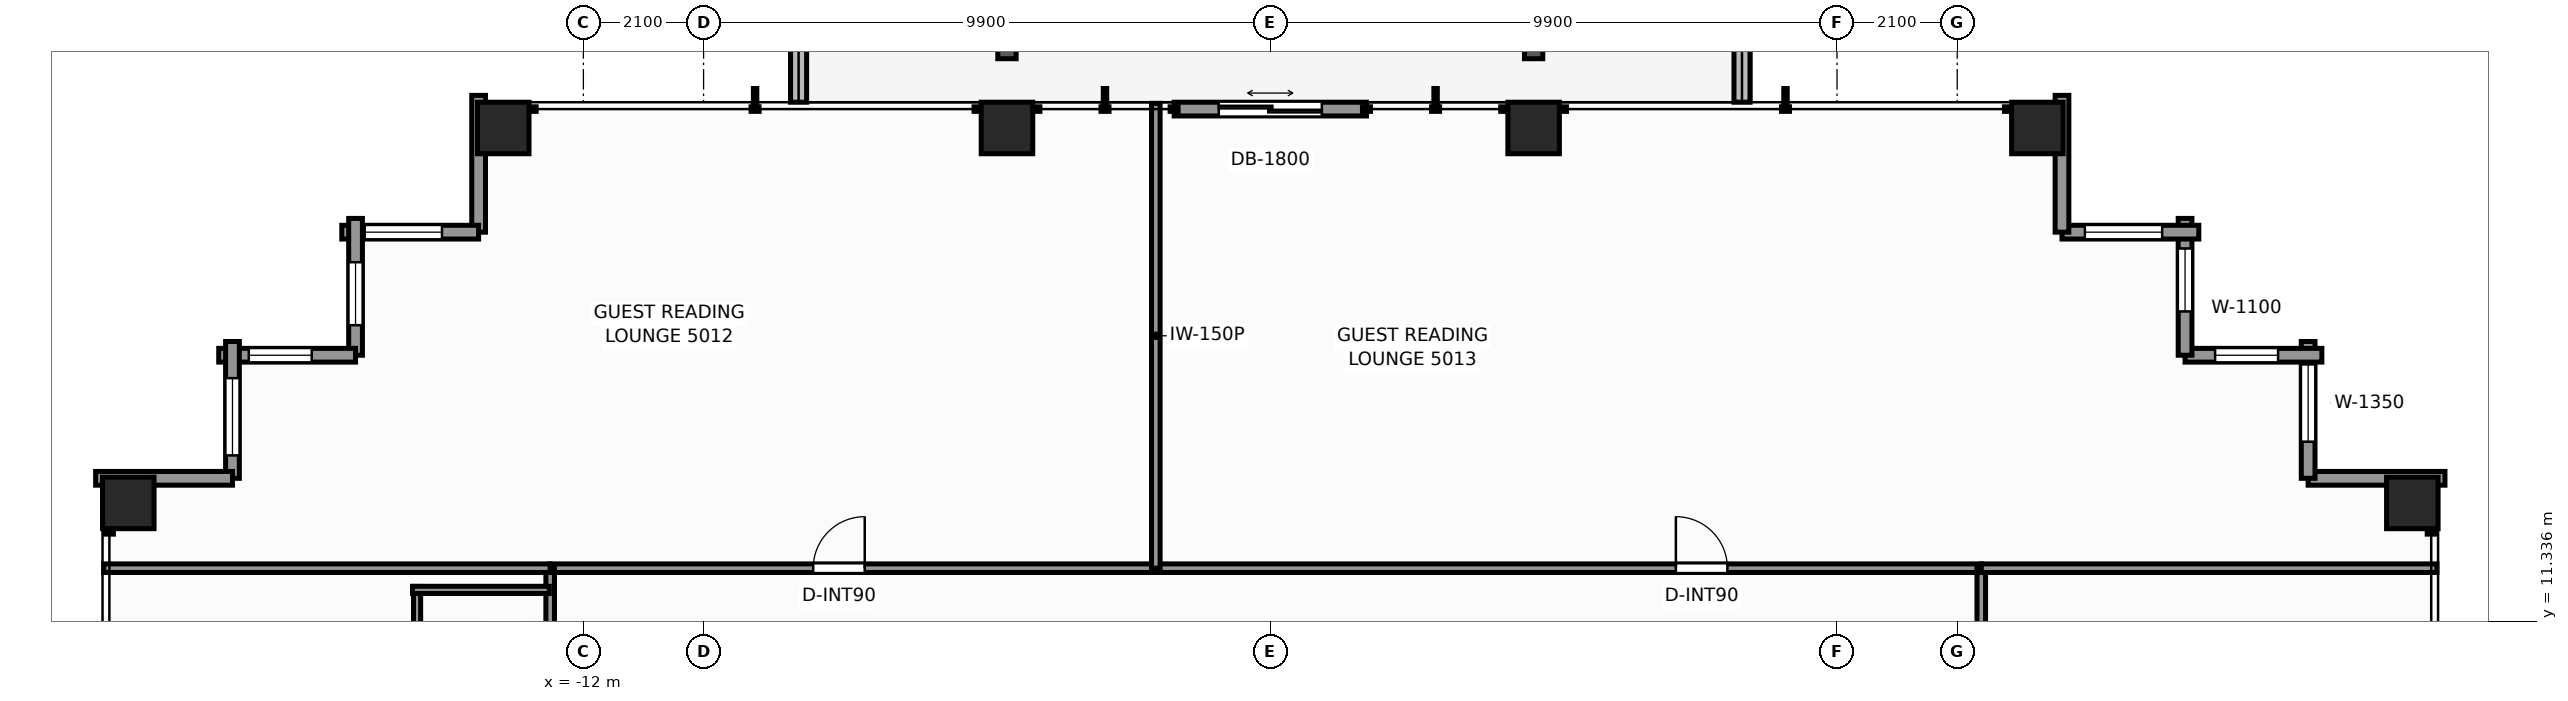
"""IFC4 building model, lengths in metres.
Left out: names, types, materials, properties, quantities, classifications, styles, units other than length and angle.
Written with IfcOpenShell. Run it as: python <this file> out.ifc"""

import sys

from ifc_helpers import new_model, si_unit, direction, frame, frame_2d, origin, origin_2d, place, context, subcontext, project, spatial, rectangle, extrude, element, fill, save


model = new_model("IFC4")
c1 = context("Model", 3, precision=1e-05, world=origin(), true_north=direction((0.0, 1.0)))
c2 = subcontext(c1, "Body", "Model", "MODEL_VIEW")
j1 = project(units=[si_unit("LENGTHUNIT", "METRE"), si_unit("PLANEANGLEUNIT", "RADIAN")], contexts=[c1])
p1 = place(None, origin())
s1 = spatial("IfcSite", under=j1, at=p1, CompositionType="ELEMENT")
p2 = place(p1, origin())
s2 = spatial("IfcBuilding", under=s1, at=p2, CompositionType="ELEMENT")
p3 = place(p2, frame((0.0, 0.0, 173.4)))
s3 = spatial("IfcBuildingStorey", under=s2, at=p3, CompositionType="ELEMENT", Elevation=173.4)
for number, where, z_axis, x_axis in (
    (1, (-13.4, 19.95, 0.0), (0.0, 0.0, 1.0), (1.0, 0.0, 0.0)),
    (2, (-4.6, 19.95, 0.0), (0.0, 0.0, 1.0), (1.0, 0.0, 0.0)),
    (3, (4.6, 19.95, 0.0), (0.0, 0.0, 1.0), (1.0, 0.0, 0.0)),
    (4, (13.4, 19.95, 0.0), (0.0, 0.0, 1.0), (1.0, 0.0, 0.0)),
    (5, (-19.95, 13.4, 0.0), (0.0, 0.0, 1.0), (1.0, 0.0, 0.0)),
    (6, (19.95, 13.4, 0.0), (0.0, 0.0, 1.0), (1.0, 0.0, 0.0)),
):
    element("IfcColumn", number, at=place(p3, frame(where, z_axis=z_axis, x_axis=x_axis)), inside=s3, PredefinedType="COLUMN", context=c2, shape_type="SweptSolid", body=[
        extrude(rectangle(XDim=0.9, YDim=0.9, at=origin_2d()), origin(), (0.0, 0.0, 1.0), 3.3),
    ])
p4 = place(p3, frame((8.24, 20.4, -0.04), z_axis=(0.0, 0.0, 1.0), x_axis=(0.0, 1.0, 0.0)))
e7 = element("IfcWall", 7, at=p4, inside=s3, PredefinedType="PARAPET", context=c2, shape_type="SweptSolid", body=[
    extrude(rectangle(XDim=1.313, YDim=0.28, at=frame_2d((0.656, 0.0))), origin(), (0.0, 0.0, 1.0), 0.42),
])
p5 = place(p3, frame((-8.24, 22.74, -0.04), z_axis=(0.0, 0.0, 1.0), x_axis=(0.0, -1.0, 0.0)))
e8 = element("IfcWall", 8, at=p5, inside=s3, PredefinedType="PARAPET", context=c2, shape_type="SweptSolid", body=[
    extrude(rectangle(XDim=2.34, YDim=0.28, at=frame_2d((1.17, 0.0))), origin(), (0.0, 0.0, 1.0), 0.42),
])
p6 = place(p3, frame((18.13, 13.83, 0.0), z_axis=(0.0, 0.0, 1.0), x_axis=(1.0, 0.0, 0.0)))
e9 = element("IfcWall", 9, at=p6, inside=s3, PredefinedType="STANDARD", context=c2, shape_type="SweptSolid", body=[
    extrude(rectangle(XDim=2.39, YDim=0.24, at=frame_2d((1.195, 0.0))), origin(), (0.0, 0.0, 1.0), 2.463),
])
p7 = place(p3, frame((18.13, 16.22, 0.0), z_axis=(0.0, 0.0, 1.0), x_axis=(0.0, -1.0, 0.0)))
e10 = element("IfcWall", 10, at=p7, inside=s3, PredefinedType="STANDARD", context=c2, shape_type="SweptSolid", body=[
    extrude(rectangle(XDim=2.39, YDim=0.24, at=frame_2d((1.195, 0.0))), origin(), (0.0, 0.0, 1.0), 2.463),
])
p8 = place(p7, frame((0.4, 0.0, 0.65)))
e11 = element("IfcOpeningElement", 11, at=p8, cuts=e10, PredefinedType="OPENING", context=c2, shape_type="SweptSolid", body=[
    extrude(rectangle(XDim=1.35, YDim=1.55, at=frame_2d((0.675, 0.775))), frame((0.0, 0.13, 0.0), z_axis=(0.0, -1.0, 0.0), x_axis=(1.0, 0.0, 0.0)), (0.0, 0.0, 1.0), 0.26),
])
p9 = place(p3, frame((15.98, 15.98, 0.0), z_axis=(0.0, 0.0, 1.0), x_axis=(1.0, 0.0, 0.0)))
e12 = element("IfcWall", 12, at=p9, inside=s3, PredefinedType="STANDARD", context=c2, shape_type="SweptSolid", body=[
    extrude(rectangle(XDim=2.39, YDim=0.24, at=frame_2d((1.195, 0.0))), origin(), (0.0, 0.0, 1.0), 2.463),
])
p10 = place(p9, frame((0.525, 0.0, 0.65)))
e13 = element("IfcOpeningElement", 13, at=p10, cuts=e12, PredefinedType="OPENING", context=c2, shape_type="SweptSolid", body=[
    extrude(rectangle(XDim=1.1, YDim=1.45, at=frame_2d((0.55, 0.725))), frame((0.0, 0.13, 0.0), z_axis=(0.0, -1.0, 0.0), x_axis=(1.0, 0.0, 0.0)), (0.0, 0.0, 1.0), 0.26),
])
p11 = place(p3, frame((15.98, 18.37, 0.0), z_axis=(0.0, 0.0, 1.0), x_axis=(0.0, -1.0, 0.0)))
e14 = element("IfcWall", 14, at=p11, inside=s3, PredefinedType="STANDARD", context=c2, shape_type="SweptSolid", body=[
    extrude(rectangle(XDim=2.39, YDim=0.24, at=frame_2d((1.195, 0.0))), origin(), (0.0, 0.0, 1.0), 2.463),
])
p12 = place(p11, frame((0.525, 0.0, 0.65)))
e15 = element("IfcOpeningElement", 15, at=p12, cuts=e14, PredefinedType="OPENING", context=c2, shape_type="SweptSolid", body=[
    extrude(rectangle(XDim=1.1, YDim=1.45, at=frame_2d((0.55, 0.725))), frame((0.0, 0.13, 0.0), z_axis=(0.0, -1.0, 0.0), x_axis=(1.0, 0.0, 0.0)), (0.0, 0.0, 1.0), 0.26),
])
p13 = place(p3, frame((13.83, 18.13, 0.0), z_axis=(0.0, 0.0, 1.0), x_axis=(1.0, 0.0, 0.0)))
e16 = element("IfcWall", 16, at=p13, inside=s3, PredefinedType="STANDARD", context=c2, shape_type="SweptSolid", body=[
    extrude(rectangle(XDim=2.39, YDim=0.24, at=frame_2d((1.195, 0.0))), origin(), (0.0, 0.0, 1.0), 2.463),
])
p14 = place(p13, frame((0.4, 0.0, 0.65)))
e17 = element("IfcOpeningElement", 17, at=p14, cuts=e16, PredefinedType="OPENING", context=c2, shape_type="SweptSolid", body=[
    extrude(rectangle(XDim=1.35, YDim=1.55, at=frame_2d((0.675, 0.775))), frame((0.0, 0.13, 0.0), z_axis=(0.0, -1.0, 0.0), x_axis=(1.0, 0.0, 0.0)), (0.0, 0.0, 1.0), 0.26),
])
p15 = place(p3, frame((13.83, 20.52, 0.0), z_axis=(0.0, 0.0, 1.0), x_axis=(0.0, -1.0, 0.0)))
e18 = element("IfcWall", 18, at=p15, inside=s3, PredefinedType="STANDARD", context=c2, shape_type="SweptSolid", body=[
    extrude(rectangle(XDim=2.39, YDim=0.24, at=frame_2d((1.195, 0.0))), origin(), (0.0, 0.0, 1.0), 2.463),
])
p16 = place(p3, frame((-1.68, 20.28, 0.0), z_axis=(0.0, 0.0, 1.0), x_axis=(1.0, 0.0, 0.0)))
e19 = element("IfcWall", 19, at=p16, inside=s3, PredefinedType="STANDARD", context=c2, shape_type="SweptSolid", body=[
    extrude(rectangle(XDim=3.36, YDim=0.24, at=frame_2d((1.68, 0.0))), origin(), (0.0, 0.0, 1.0), 3.08),
])
p17 = place(p16, frame((0.78, 0.0, 0.0)))
e20 = element("IfcOpeningElement", 20, at=p17, cuts=e19, PredefinedType="OPENING", context=c2, shape_type="SweptSolid", body=[
    extrude(rectangle(XDim=1.8, YDim=2.2, at=frame_2d((0.9, 1.1))), frame((0.0, 0.13, 0.0), z_axis=(0.0, -1.0, 0.0), x_axis=(1.0, 0.0, 0.0)), (0.0, 0.0, 1.0), 0.26),
])
p18 = place(p3, frame((-13.83, 18.13, 0.0), z_axis=(0.0, 0.0, 1.0), x_axis=(0.0, 1.0, 0.0)))
e21 = element("IfcWall", 21, at=p18, inside=s3, PredefinedType="STANDARD", context=c2, shape_type="SweptSolid", body=[
    extrude(rectangle(XDim=2.39, YDim=0.24, at=frame_2d((1.195, 0.0))), origin(), (0.0, 0.0, 1.0), 2.463),
])
p19 = place(p3, frame((-16.22, 18.13, 0.0), z_axis=(0.0, 0.0, 1.0), x_axis=(1.0, 0.0, 0.0)))
e22 = element("IfcWall", 22, at=p19, inside=s3, PredefinedType="STANDARD", context=c2, shape_type="SweptSolid", body=[
    extrude(rectangle(XDim=2.39, YDim=0.24, at=frame_2d((1.195, 0.0))), origin(), (0.0, 0.0, 1.0), 2.463),
])
p20 = place(p19, frame((0.4, 0.0, 0.65)))
e23 = element("IfcOpeningElement", 23, at=p20, cuts=e22, PredefinedType="OPENING", context=c2, shape_type="SweptSolid", body=[
    extrude(rectangle(XDim=1.35, YDim=1.55, at=frame_2d((0.675, 0.775))), frame((0.0, 0.13, 0.0), z_axis=(0.0, -1.0, 0.0), x_axis=(1.0, 0.0, 0.0)), (0.0, 0.0, 1.0), 0.26),
])
p21 = place(p3, frame((-15.98, 15.98, 0.0), z_axis=(0.0, 0.0, 1.0), x_axis=(0.0, 1.0, 0.0)))
e24 = element("IfcWall", 24, at=p21, inside=s3, PredefinedType="STANDARD", context=c2, shape_type="SweptSolid", body=[
    extrude(rectangle(XDim=2.39, YDim=0.24, at=frame_2d((1.195, 0.0))), origin(), (0.0, 0.0, 1.0), 2.463),
])
p22 = place(p21, frame((0.525, 0.0, 0.65)))
e25 = element("IfcOpeningElement", 25, at=p22, cuts=e24, PredefinedType="OPENING", context=c2, shape_type="SweptSolid", body=[
    extrude(rectangle(XDim=1.1, YDim=1.45, at=frame_2d((0.55, 0.725))), frame((0.0, 0.13, 0.0), z_axis=(0.0, -1.0, 0.0), x_axis=(1.0, 0.0, 0.0)), (0.0, 0.0, 1.0), 0.26),
])
p23 = place(p3, frame((-18.37, 15.98, 0.0), z_axis=(0.0, 0.0, 1.0), x_axis=(1.0, 0.0, 0.0)))
e26 = element("IfcWall", 26, at=p23, inside=s3, PredefinedType="STANDARD", context=c2, shape_type="SweptSolid", body=[
    extrude(rectangle(XDim=2.39, YDim=0.24, at=frame_2d((1.195, 0.0))), origin(), (0.0, 0.0, 1.0), 2.463),
])
p24 = place(p23, frame((0.525, 0.0, 0.65)))
e27 = element("IfcOpeningElement", 27, at=p24, cuts=e26, PredefinedType="OPENING", context=c2, shape_type="SweptSolid", body=[
    extrude(rectangle(XDim=1.1, YDim=1.45, at=frame_2d((0.55, 0.725))), frame((0.0, 0.13, 0.0), z_axis=(0.0, -1.0, 0.0), x_axis=(1.0, 0.0, 0.0)), (0.0, 0.0, 1.0), 0.26),
])
p25 = place(p3, frame((-18.13, 13.83, 0.0), z_axis=(0.0, 0.0, 1.0), x_axis=(0.0, 1.0, 0.0)))
e28 = element("IfcWall", 28, at=p25, inside=s3, PredefinedType="STANDARD", context=c2, shape_type="SweptSolid", body=[
    extrude(rectangle(XDim=2.39, YDim=0.24, at=frame_2d((1.195, 0.0))), origin(), (0.0, 0.0, 1.0), 2.463),
])
p26 = place(p25, frame((0.4, 0.0, 0.65)))
e29 = element("IfcOpeningElement", 29, at=p26, cuts=e28, PredefinedType="OPENING", context=c2, shape_type="SweptSolid", body=[
    extrude(rectangle(XDim=1.35, YDim=1.55, at=frame_2d((0.675, 0.775))), frame((0.0, 0.13, 0.0), z_axis=(0.0, -1.0, 0.0), x_axis=(1.0, 0.0, 0.0)), (0.0, 0.0, 1.0), 0.26),
])
p27 = place(p3, frame((-20.52, 13.83, 0.0), z_axis=(0.0, 0.0, 1.0), x_axis=(1.0, 0.0, 0.0)))
e30 = element("IfcWall", 30, at=p27, inside=s3, PredefinedType="STANDARD", context=c2, shape_type="SweptSolid", body=[
    extrude(rectangle(XDim=2.39, YDim=0.24, at=frame_2d((1.195, 0.0))), origin(), (0.0, 0.0, 1.0), 2.463),
])
p28 = place(p3, frame((-12.58, 12.26, 0.0), z_axis=(0.0, 0.0, 1.0), x_axis=(1.0, 0.0, 0.0)))
e31 = element("IfcWall", 31, at=p28, inside=s3, PredefinedType="PARTITIONING", context=c2, shape_type="SweptSolid", body=[
    extrude(rectangle(XDim=25.0, YDim=0.15, at=frame_2d((12.5, 0.0))), origin(), (0.0, 0.0, 1.0), 2.369),
])
p29 = place(p28, frame((4.595, 0.0, 0.0)))
e32 = element("IfcOpeningElement", 32, at=p29, cuts=e31, PredefinedType="OPENING", context=c2, shape_type="SweptSolid", body=[
    extrude(rectangle(XDim=0.9, YDim=2.06, at=frame_2d((0.45, 1.03))), frame((0.0, 0.085, 0.0), z_axis=(0.0, -1.0, 0.0), x_axis=(1.0, 0.0, 0.0)), (0.0, 0.0, 1.0), 0.17),
])
p30 = place(p28, frame((19.665, 0.0, 0.0)))
e33 = element("IfcOpeningElement", 33, at=p30, cuts=e31, PredefinedType="OPENING", context=c2, shape_type="SweptSolid", body=[
    extrude(rectangle(XDim=0.9, YDim=2.06, at=frame_2d((0.45, 1.03))), frame((0.0, 0.085, 0.0), z_axis=(0.0, -1.0, 0.0), x_axis=(1.0, 0.0, 0.0)), (0.0, 0.0, 1.0), 0.17),
])
p31 = place(p3, frame((-12.58, -12.58, 0.0), z_axis=(0.0, 0.0, 1.0), x_axis=(0.0, 1.0, 0.0)))
e34 = element("IfcWall", 34, at=p31, inside=s3, PredefinedType="PARTITIONING", context=c2, shape_type="SweptSolid", body=[
    extrude(rectangle(XDim=24.84, YDim=0.15, at=frame_2d((12.42, 0.0))), origin(), (0.0, 0.0, 1.0), 2.369),
])
p32 = place(p31, frame((3.831, 0.0, 0.0)))
e35 = element("IfcOpeningElement", 35, at=p32, cuts=e34, PredefinedType="OPENING", context=c2, shape_type="SweptSolid", body=[
    extrude(rectangle(XDim=0.95, YDim=2.06, at=frame_2d((0.475, 1.03))), frame((0.0, 0.085, 0.0), z_axis=(0.0, -1.0, 0.0), x_axis=(1.0, 0.0, 0.0)), (0.0, 0.0, 1.0), 0.17),
])
p33 = place(p31, frame((9.378, 0.0, 0.0)))
e36 = element("IfcOpeningElement", 36, at=p33, cuts=e34, PredefinedType="OPENING", context=c2, shape_type="SweptSolid", body=[
    extrude(rectangle(XDim=0.95, YDim=2.06, at=frame_2d((0.475, 1.03))), frame((0.0, 0.085, 0.0), z_axis=(0.0, -1.0, 0.0), x_axis=(1.0, 0.0, 0.0)), (0.0, 0.0, 1.0), 0.17),
])
p34 = place(p31, frame((14.903, 0.0, 0.0)))
e37 = element("IfcOpeningElement", 37, at=p34, cuts=e34, PredefinedType="OPENING", context=c2, shape_type="SweptSolid", body=[
    extrude(rectangle(XDim=0.95, YDim=2.06, at=frame_2d((0.475, 1.03))), frame((0.0, 0.085, 0.0), z_axis=(0.0, -1.0, 0.0), x_axis=(1.0, 0.0, 0.0)), (0.0, 0.0, 1.0), 0.17),
])
p35 = place(p31, frame((19.246, 0.0, 0.0)))
e38 = element("IfcOpeningElement", 38, at=p35, cuts=e34, PredefinedType="OPENING", context=c2, shape_type="SweptSolid", body=[
    extrude(rectangle(XDim=0.95, YDim=2.06, at=frame_2d((0.475, 1.03))), frame((0.0, 0.085, 0.0), z_axis=(0.0, -1.0, 0.0), x_axis=(1.0, 0.0, 0.0)), (0.0, 0.0, 1.0), 0.17),
])
p36 = place(p3, frame((12.42, -12.58, 0.0), z_axis=(0.0, 0.0, 1.0), x_axis=(0.0, 1.0, 0.0)))
e39 = element("IfcWall", 39, at=p36, inside=s3, PredefinedType="PARTITIONING", context=c2, shape_type="SweptSolid", body=[
    extrude(rectangle(XDim=24.84, YDim=0.15, at=frame_2d((12.42, 0.0))), origin(), (0.0, 0.0, 1.0), 2.369),
])
p37 = place(p36, frame((3.573, 0.0, 0.0)))
e40 = element("IfcOpeningElement", 40, at=p37, cuts=e39, PredefinedType="OPENING", context=c2, shape_type="SweptSolid", body=[
    extrude(rectangle(XDim=0.95, YDim=2.06, at=frame_2d((0.475, 1.03))), frame((0.0, 0.085, 0.0), z_axis=(0.0, -1.0, 0.0), x_axis=(1.0, 0.0, 0.0)), (0.0, 0.0, 1.0), 0.17),
])
p38 = place(p36, frame((10.075, 0.0, 0.0)))
e41 = element("IfcOpeningElement", 41, at=p38, cuts=e39, PredefinedType="OPENING", context=c2, shape_type="SweptSolid", body=[
    extrude(rectangle(XDim=0.95, YDim=2.06, at=frame_2d((0.475, 1.03))), frame((0.0, 0.085, 0.0), z_axis=(0.0, -1.0, 0.0), x_axis=(1.0, 0.0, 0.0)), (0.0, 0.0, 1.0), 0.17),
])
p39 = place(p36, frame((19.64, 0.0, 0.0)))
e42 = element("IfcOpeningElement", 42, at=p39, cuts=e39, PredefinedType="OPENING", context=c2, shape_type="SweptSolid", body=[
    extrude(rectangle(XDim=0.95, YDim=2.06, at=frame_2d((0.475, 1.03))), frame((0.0, 0.085, 0.0), z_axis=(0.0, -1.0, 0.0), x_axis=(1.0, 0.0, 0.0)), (0.0, 0.0, 1.0), 0.17),
])
p40 = place(p3, frame((-20.38, 12.26, 0.0), z_axis=(0.0, 0.0, 1.0), x_axis=(1.0, 0.0, 0.0)))
e43 = element("IfcWall", 43, at=p40, inside=s3, PredefinedType="PARTITIONING", context=c2, shape_type="SweptSolid", body=[
    extrude(rectangle(XDim=7.8, YDim=0.15, at=frame_2d((3.9, 0.0))), origin(), (0.0, 0.0, 1.0), 2.369),
])
p41 = place(p3, frame((12.42, 12.26, 0.0), z_axis=(0.0, 0.0, 1.0), x_axis=(1.0, 0.0, 0.0)))
e44 = element("IfcWall", 44, at=p41, inside=s3, PredefinedType="PARTITIONING", context=c2, shape_type="SweptSolid", body=[
    extrude(rectangle(XDim=7.96, YDim=0.15, at=frame_2d((3.98, 0.0))), origin(), (0.0, 0.0, 1.0), 2.369),
])
p42 = place(p3, frame((-14.905, 9.171, 0.0), z_axis=(0.0, 0.0, 1.0), x_axis=(0.0, 1.0, 0.0)))
e45 = element("IfcWall", 45, at=p42, inside=s3, PredefinedType="PARTITIONING", context=c2, shape_type="SweptSolid", body=[
    extrude(rectangle(XDim=2.77, YDim=0.125, at=frame_2d((1.385, 0.0))), origin(), (0.0, 0.0, 1.0), 2.369),
])
p43 = place(p3, frame((-14.985, 11.881, 0.0), z_axis=(0.0, 0.0, 1.0), x_axis=(1.0, 0.0, 0.0)))
e46 = element("IfcWall", 46, at=p43, inside=s3, PredefinedType="PARTITIONING", context=c2, shape_type="SweptSolid", body=[
    extrude(rectangle(XDim=2.39, YDim=0.125, at=frame_2d((1.195, 0.0))), origin(), (0.0, 0.0, 1.0), 2.369),
])
p44 = place(p3, frame((-2.0, 12.26, 0.0), z_axis=(0.0, 0.0, 1.0), x_axis=(0.0, 1.0, 0.0)))
e47 = element("IfcWall", 47, at=p44, inside=s3, PredefinedType="PARTITIONING", context=c2, shape_type="SweptSolid", body=[
    extrude(rectangle(XDim=8.12, YDim=0.15, at=frame_2d((4.06, 0.0))), origin(), (0.0, 0.0, 1.0), 2.453),
])
p45 = place(p8, origin())
e48 = element("IfcWindow", 48, at=p45, inside=s3, PartitioningType="SINGLE_PANEL", PredefinedType="WINDOW", context=c2, shape_type="SweptSolid", body=[
    extrude(rectangle(XDim=1.35, YDim=1.55, at=frame_2d((0.675, 0.775))), frame((0.0, 0.03, 0.0), z_axis=(0.0, -1.0, 0.0), x_axis=(1.0, 0.0, 0.0)), (0.0, 0.0, 1.0), 0.06),
])
fill(e11, e48)
p46 = place(p10, origin())
e49 = element("IfcWindow", 49, at=p46, inside=s3, PartitioningType="SINGLE_PANEL", PredefinedType="WINDOW", context=c2, shape_type="SweptSolid", body=[
    extrude(rectangle(XDim=1.1, YDim=1.45, at=frame_2d((0.55, 0.725))), frame((0.0, 0.03, 0.0), z_axis=(0.0, -1.0, 0.0), x_axis=(1.0, 0.0, 0.0)), (0.0, 0.0, 1.0), 0.06),
])
fill(e13, e49)
p47 = place(p12, origin())
e50 = element("IfcWindow", 50, at=p47, inside=s3, PartitioningType="SINGLE_PANEL", PredefinedType="WINDOW", context=c2, shape_type="SweptSolid", body=[
    extrude(rectangle(XDim=1.1, YDim=1.45, at=frame_2d((0.55, 0.725))), frame((0.0, 0.03, 0.0), z_axis=(0.0, -1.0, 0.0), x_axis=(1.0, 0.0, 0.0)), (0.0, 0.0, 1.0), 0.06),
])
fill(e15, e50)
p48 = place(p14, origin())
e51 = element("IfcWindow", 51, at=p48, inside=s3, PartitioningType="SINGLE_PANEL", PredefinedType="WINDOW", context=c2, shape_type="SweptSolid", body=[
    extrude(rectangle(XDim=1.35, YDim=1.55, at=frame_2d((0.675, 0.775))), frame((0.0, 0.03, 0.0), z_axis=(0.0, -1.0, 0.0), x_axis=(1.0, 0.0, 0.0)), (0.0, 0.0, 1.0), 0.06),
])
fill(e17, e51)
p49 = place(p17, origin())
e52 = element("IfcDoor", 52, at=p49, inside=s3, OperationType="DOUBLE_DOOR_SLIDING", PredefinedType="DOOR", context=c2, shape_type="SweptSolid", body=[
    extrude(rectangle(XDim=1.8, YDim=2.2, at=frame_2d((0.9, 1.1))), frame((0.0, 0.025, 0.0), z_axis=(0.0, -1.0, 0.0), x_axis=(1.0, 0.0, 0.0)), (0.0, 0.0, 1.0), 0.05),
])
fill(e20, e52)
p50 = place(p20, origin())
e53 = element("IfcWindow", 53, at=p50, inside=s3, PartitioningType="SINGLE_PANEL", PredefinedType="WINDOW", context=c2, shape_type="SweptSolid", body=[
    extrude(rectangle(XDim=1.35, YDim=1.55, at=frame_2d((0.675, 0.775))), frame((0.0, 0.03, 0.0), z_axis=(0.0, -1.0, 0.0), x_axis=(1.0, 0.0, 0.0)), (0.0, 0.0, 1.0), 0.06),
])
fill(e23, e53)
p51 = place(p22, origin())
e54 = element("IfcWindow", 54, at=p51, inside=s3, PartitioningType="SINGLE_PANEL", PredefinedType="WINDOW", context=c2, shape_type="SweptSolid", body=[
    extrude(rectangle(XDim=1.1, YDim=1.45, at=frame_2d((0.55, 0.725))), frame((0.0, 0.03, 0.0), z_axis=(0.0, -1.0, 0.0), x_axis=(1.0, 0.0, 0.0)), (0.0, 0.0, 1.0), 0.06),
])
fill(e25, e54)
p52 = place(p24, origin())
e55 = element("IfcWindow", 55, at=p52, inside=s3, PartitioningType="SINGLE_PANEL", PredefinedType="WINDOW", context=c2, shape_type="SweptSolid", body=[
    extrude(rectangle(XDim=1.1, YDim=1.45, at=frame_2d((0.55, 0.725))), frame((0.0, 0.03, 0.0), z_axis=(0.0, -1.0, 0.0), x_axis=(1.0, 0.0, 0.0)), (0.0, 0.0, 1.0), 0.06),
])
fill(e27, e55)
p53 = place(p26, origin())
e56 = element("IfcWindow", 56, at=p53, inside=s3, PartitioningType="SINGLE_PANEL", PredefinedType="WINDOW", context=c2, shape_type="SweptSolid", body=[
    extrude(rectangle(XDim=1.35, YDim=1.55, at=frame_2d((0.675, 0.775))), frame((0.0, 0.03, 0.0), z_axis=(0.0, -1.0, 0.0), x_axis=(1.0, 0.0, 0.0)), (0.0, 0.0, 1.0), 0.06),
])
fill(e29, e56)
p54 = place(p29, origin())
e57 = element("IfcDoor", 57, at=p54, inside=s3, OperationType="SINGLE_SWING_RIGHT", PredefinedType="DOOR", context=c2, shape_type="SweptSolid", body=[
    extrude(rectangle(XDim=0.9, YDim=2.06, at=frame_2d((0.45, 1.03))), frame((0.0, 0.025, 0.0), z_axis=(0.0, -1.0, 0.0), x_axis=(1.0, 0.0, 0.0)), (0.0, 0.0, 1.0), 0.05),
])
fill(e32, e57)
p55 = place(p30, origin())
e58 = element("IfcDoor", 58, at=p55, inside=s3, OperationType="SINGLE_SWING_LEFT", PredefinedType="DOOR", context=c2, shape_type="SweptSolid", body=[
    extrude(rectangle(XDim=0.9, YDim=2.06, at=frame_2d((0.45, 1.03))), frame((0.0, 0.025, 0.0), z_axis=(0.0, -1.0, 0.0), x_axis=(1.0, 0.0, 0.0)), (0.0, 0.0, 1.0), 0.05),
])
fill(e33, e58)
save(model, sys.argv[1])
